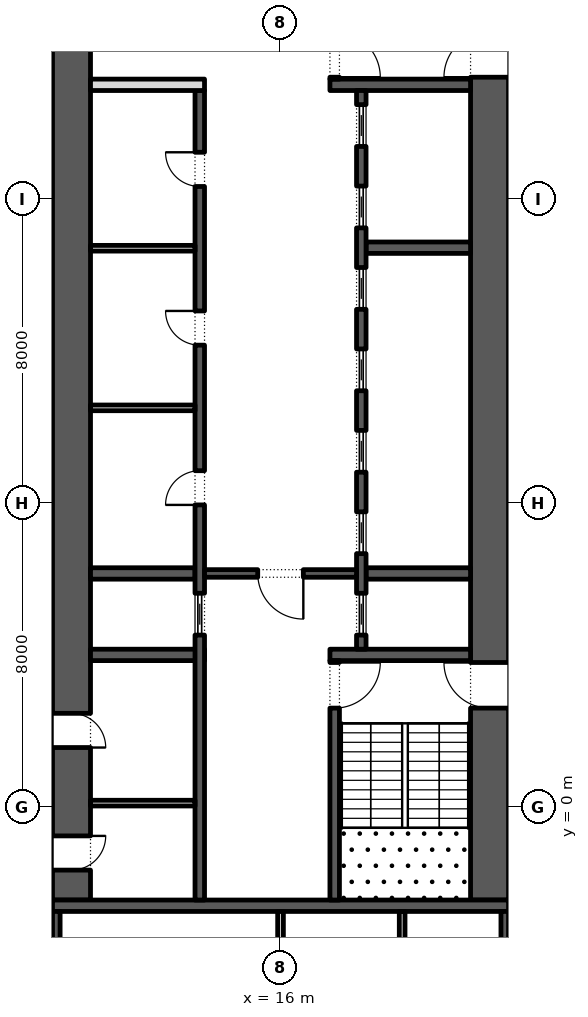
"""IFC4 building model, lengths in metres.
Left out: names, types, materials, properties, quantities, classifications, styles, units other than length and angle.
Written with IfcOpenShell. Run it as: python <this file> out.ifc"""

import sys

from ifc_helpers import new_model, si_unit, direction, frame, frame_2d, origin, place, context, subcontext, project, spatial, rectangle, extrude, element, fill, save


model = new_model("IFC4")
c1 = context("Model", 3, precision=1e-05, world=origin(), true_north=direction((0.0, 1.0)))
c2 = subcontext(c1, "Body", "Model", "MODEL_VIEW")
j1 = project(units=[si_unit("LENGTHUNIT", "METRE"), si_unit("PLANEANGLEUNIT", "RADIAN")], contexts=[c1])
p1 = place(None, origin())
s1 = spatial("IfcSite", under=j1, at=p1, CompositionType="ELEMENT")
p2 = place(p1, origin())
s2 = spatial("IfcBuilding", under=s1, at=p2, CompositionType="ELEMENT")
p3 = place(p2, frame((0.0, 0.0, 77.4)))
s3 = spatial("IfcBuildingStorey", under=s2, at=p3, CompositionType="ELEMENT", Elevation=77.4)
p4 = place(p3, frame((21.5, -2.45, 0.0), z_axis=(0.0, 0.0, 1.0), x_axis=(0.0, 1.0, 0.0)))
e1 = element("IfcWall", 1, at=p4, inside=s3, PredefinedType="SHEAR", context=c2, shape_type="SweptSolid", body=[
    extrude(rectangle(XDim=27.9, YDim=1.0, at=frame_2d((13.95, 0.0))), origin(), (0.0, 0.0, 1.0), 4.0),
])
p5 = place(p4, frame((5.05, 0.0, 0.0)))
e2 = element("IfcOpeningElement", 2, at=p5, cuts=e1, PredefinedType="OPENING", context=c2, shape_type="SweptSolid", body=[
    extrude(rectangle(XDim=1.2, YDim=2.1, at=frame_2d((0.6, 1.05))), frame((0.0, 0.51, 0.0), z_axis=(0.0, -1.0, 0.0), x_axis=(1.0, 0.0, 0.0)), (0.0, 0.0, 1.0), 1.02),
])
p6 = place(p4, frame((21.65, 0.0, 0.0)))
e3 = element("IfcOpeningElement", 3, at=p6, cuts=e1, PredefinedType="OPENING", context=c2, shape_type="SweptSolid", body=[
    extrude(rectangle(XDim=1.2, YDim=2.1, at=frame_2d((0.6, 1.05))), frame((0.0, 0.51, 0.0), z_axis=(0.0, -1.0, 0.0), x_axis=(1.0, 0.0, 0.0)), (0.0, 0.0, 1.0), 1.02),
])
p7 = place(p3, frame((10.5, -2.45, 0.0), z_axis=(0.0, 0.0, 1.0), x_axis=(0.0, 1.0, 0.0)))
e4 = element("IfcWall", 4, at=p7, inside=s3, PredefinedType="SHEAR", context=c2, shape_type="SweptSolid", body=[
    extrude(rectangle(XDim=27.9, YDim=1.0, at=frame_2d((13.95, 0.0))), origin(), (0.0, 0.0, 1.0), 4.0),
])
p8 = place(p7, frame((23.65, 0.0, 0.0)))
e5 = element("IfcOpeningElement", 5, at=p8, cuts=e4, PredefinedType="OPENING", context=c2, shape_type="SweptSolid", body=[
    extrude(rectangle(XDim=2.4, YDim=2.1, at=frame_2d((1.2, 1.05))), frame((0.0, 0.51, 0.0), z_axis=(0.0, -1.0, 0.0), x_axis=(1.0, 0.0, 0.0)), (0.0, 0.0, 1.0), 1.02),
])
p9 = place(p7, frame((0.788, 0.0, 0.0)))
e6 = element("IfcOpeningElement", 6, at=p9, cuts=e4, PredefinedType="OPENING", context=c2, shape_type="SweptSolid", body=[
    extrude(rectangle(XDim=0.9, YDim=2.1, at=frame_2d((0.45, 1.05))), frame((0.0, 0.51, 0.0), z_axis=(0.0, -1.0, 0.0), x_axis=(1.0, 0.0, 0.0)), (0.0, 0.0, 1.0), 1.02),
])
p10 = place(p7, frame((4.012, 0.0, 0.0)))
e7 = element("IfcOpeningElement", 7, at=p10, cuts=e4, PredefinedType="OPENING", context=c2, shape_type="SweptSolid", body=[
    extrude(rectangle(XDim=0.9, YDim=2.1, at=frame_2d((0.45, 1.05))), frame((0.0, 0.51, 0.0), z_axis=(0.0, -1.0, 0.0), x_axis=(1.0, 0.0, 0.0)), (0.0, 0.0, 1.0), 1.02),
])
p11 = place(p3, frame((10.0, -2.6, 0.0), z_axis=(0.0, 0.0, 1.0), x_axis=(1.0, 0.0, 0.0)))
e8 = element("IfcWall", 8, at=p11, inside=s3, PredefinedType="SHEAR", context=c2, shape_type="SweptSolid", body=[
    extrude(rectangle(XDim=12.0, YDim=0.3, at=frame_2d((6.0, 0.0))), origin(), (0.0, 0.0, 1.0), 4.0),
])
p12 = place(p3, frame((17.3, 4.0, 0.0), z_axis=(0.0, 0.0, 1.0), x_axis=(1.0, 0.0, 0.0)))
e9 = element("IfcWall", 9, at=p12, inside=s3, PredefinedType="SHEAR", context=c2, shape_type="SweptSolid", body=[
    extrude(rectangle(XDim=3.7, YDim=0.3, at=frame_2d((1.85, 0.0))), origin(), (0.0, 0.0, 1.0), 4.0),
])
p13 = place(p3, frame((17.425, -2.45, 0.0), z_axis=(0.0, 0.0, 1.0), x_axis=(0.0, 1.0, 0.0)))
e10 = element("IfcWall", 10, at=p13, inside=s3, PredefinedType="SHEAR", context=c2, shape_type="SweptSolid", body=[
    extrude(rectangle(XDim=6.3, YDim=0.25, at=frame_2d((3.15, 0.0))), origin(), (0.0, 0.0, 1.0), 4.0),
])
p14 = place(p13, frame((5.05, 0.0, 0.0)))
e11 = element("IfcOpeningElement", 11, at=p14, cuts=e10, PredefinedType="OPENING", context=c2, shape_type="SweptSolid", body=[
    extrude(rectangle(XDim=1.2, YDim=2.1, at=frame_2d((0.6, 1.05))), frame((0.0, 0.135, 0.0), z_axis=(0.0, -1.0, 0.0), x_axis=(1.0, 0.0, 0.0)), (0.0, 0.0, 1.0), 0.27),
])
p15 = place(p3, frame((17.3, 19.0, 0.0), z_axis=(0.0, 0.0, 1.0), x_axis=(1.0, 0.0, 0.0)))
e12 = element("IfcWall", 12, at=p15, inside=s3, PredefinedType="SHEAR", context=c2, shape_type="SweptSolid", body=[
    extrude(rectangle(XDim=3.7, YDim=0.3, at=frame_2d((1.85, 0.0))), origin(), (0.0, 0.0, 1.0), 4.0),
])
p16 = place(p3, frame((17.425, 19.15, 0.0), z_axis=(0.0, 0.0, 1.0), x_axis=(0.0, 1.0, 0.0)))
e13 = element("IfcWall", 13, at=p16, inside=s3, PredefinedType="SHEAR", context=c2, shape_type="SweptSolid", body=[
    extrude(rectangle(XDim=6.3, YDim=0.25, at=frame_2d((3.15, 0.0))), origin(), (0.0, 0.0, 1.0), 4.0),
])
p17 = place(p16, frame((0.05, 0.0, 0.0)))
e14 = element("IfcOpeningElement", 14, at=p17, cuts=e13, PredefinedType="OPENING", context=c2, shape_type="SweptSolid", body=[
    extrude(rectangle(XDim=1.2, YDim=2.1, at=frame_2d((0.6, 1.05))), frame((0.0, 0.135, 0.0), z_axis=(0.0, -1.0, 0.0), x_axis=(1.0, 0.0, 0.0)), (0.0, 0.0, 1.0), 0.27),
])
for number, where, z_axis, x_axis in (
    (15, (18.25, 6.143, 0.0), (0.0, 0.0, 1.0), (1.0, 0.0, 0.0)),
    (16, (18.25, 14.714, 0.0), (0.0, 0.0, 1.0), (1.0, 0.0, 0.0)),
):
    element("IfcWall", number, at=place(p3, frame(where, z_axis=z_axis, x_axis=x_axis)), inside=s3, PredefinedType="SHEAR", context=c2, shape_type="SweptSolid", body=[
        extrude(rectangle(XDim=2.75, YDim=0.3, at=frame_2d((1.375, 0.0))), origin(), (0.0, 0.0, 1.0), 4.0),
    ])
p18 = place(p3, frame((18.125, 4.15, 0.0), z_axis=(0.0, 0.0, 1.0), x_axis=(0.0, 1.0, 0.0)))
e17 = element("IfcWall", 17, at=p18, inside=s3, PredefinedType="SHEAR", context=c2, shape_type="SweptSolid", body=[
    extrude(rectangle(XDim=14.7, YDim=0.25, at=frame_2d((7.35, 0.0))), origin(), (0.0, 0.0, 1.0), 4.0),
])
p19 = place(p18, frame((0.371, 0.0, 0.0)))
e18 = element("IfcOpeningElement", 18, at=p19, cuts=e17, PredefinedType="OPENING", context=c2, shape_type="SweptSolid", body=[
    extrude(rectangle(XDim=1.1, YDim=2.1, at=frame_2d((0.55, 1.05))), frame((0.0, 0.135, 0.0), z_axis=(0.0, -1.0, 0.0), x_axis=(1.0, 0.0, 0.0)), (0.0, 0.0, 1.0), 0.27),
])
p20 = place(p18, frame((2.514, 0.0, 0.0)))
e19 = element("IfcOpeningElement", 19, at=p20, cuts=e17, PredefinedType="OPENING", context=c2, shape_type="SweptSolid", body=[
    extrude(rectangle(XDim=1.1, YDim=2.1, at=frame_2d((0.55, 1.05))), frame((0.0, 0.135, 0.0), z_axis=(0.0, -1.0, 0.0), x_axis=(1.0, 0.0, 0.0)), (0.0, 0.0, 1.0), 0.27),
])
p21 = place(p18, frame((4.657, 0.0, 0.0)))
e20 = element("IfcOpeningElement", 20, at=p21, cuts=e17, PredefinedType="OPENING", context=c2, shape_type="SweptSolid", body=[
    extrude(rectangle(XDim=1.1, YDim=2.1, at=frame_2d((0.55, 1.05))), frame((0.0, 0.135, 0.0), z_axis=(0.0, -1.0, 0.0), x_axis=(1.0, 0.0, 0.0)), (0.0, 0.0, 1.0), 0.27),
])
p22 = place(p18, frame((6.8, 0.0, 0.0)))
e21 = element("IfcOpeningElement", 21, at=p22, cuts=e17, PredefinedType="OPENING", context=c2, shape_type="SweptSolid", body=[
    extrude(rectangle(XDim=1.1, YDim=2.1, at=frame_2d((0.55, 1.05))), frame((0.0, 0.135, 0.0), z_axis=(0.0, -1.0, 0.0), x_axis=(1.0, 0.0, 0.0)), (0.0, 0.0, 1.0), 0.27),
])
p23 = place(p18, frame((8.943, 0.0, 0.0)))
e22 = element("IfcOpeningElement", 22, at=p23, cuts=e17, PredefinedType="OPENING", context=c2, shape_type="SweptSolid", body=[
    extrude(rectangle(XDim=1.1, YDim=2.1, at=frame_2d((0.55, 1.05))), frame((0.0, 0.135, 0.0), z_axis=(0.0, -1.0, 0.0), x_axis=(1.0, 0.0, 0.0)), (0.0, 0.0, 1.0), 0.27),
])
p24 = place(p18, frame((11.086, 0.0, 0.0)))
e23 = element("IfcOpeningElement", 23, at=p24, cuts=e17, PredefinedType="OPENING", context=c2, shape_type="SweptSolid", body=[
    extrude(rectangle(XDim=1.1, YDim=2.1, at=frame_2d((0.55, 1.05))), frame((0.0, 0.135, 0.0), z_axis=(0.0, -1.0, 0.0), x_axis=(1.0, 0.0, 0.0)), (0.0, 0.0, 1.0), 0.27),
])
p25 = place(p18, frame((13.229, 0.0, 0.0)))
e24 = element("IfcOpeningElement", 24, at=p25, cuts=e17, PredefinedType="OPENING", context=c2, shape_type="SweptSolid", body=[
    extrude(rectangle(XDim=1.1, YDim=2.1, at=frame_2d((0.55, 1.05))), frame((0.0, 0.135, 0.0), z_axis=(0.0, -1.0, 0.0), x_axis=(1.0, 0.0, 0.0)), (0.0, 0.0, 1.0), 0.27),
])
p26 = place(p3, frame((11.0, 4.0, 0.0), z_axis=(0.0, 0.0, 1.0), x_axis=(1.0, 0.0, 0.0)))
e25 = element("IfcWall", 25, at=p26, inside=s3, PredefinedType="SHEAR", context=c2, shape_type="SweptSolid", body=[
    extrude(rectangle(XDim=3.0, YDim=0.3, at=frame_2d((1.5, 0.0))), origin(), (0.0, 0.0, 1.0), 4.0),
])
p27 = place(p3, frame((11.0, 6.143, 0.0), z_axis=(0.0, 0.0, 1.0), x_axis=(1.0, 0.0, 0.0)))
e26 = element("IfcWall", 26, at=p27, inside=s3, PredefinedType="SHEAR", context=c2, shape_type="SweptSolid", body=[
    extrude(rectangle(XDim=2.75, YDim=0.3, at=frame_2d((1.375, 0.0))), origin(), (0.0, 0.0, 1.0), 4.0),
])
p28 = place(p3, frame((13.875, -2.45, 0.0), z_axis=(0.0, 0.0, 1.0), x_axis=(0.0, 1.0, 0.0)))
e27 = element("IfcWall", 27, at=p28, inside=s3, PredefinedType="SHEAR", context=c2, shape_type="SweptSolid", body=[
    extrude(rectangle(XDim=21.3, YDim=0.25, at=frame_2d((10.65, 0.0))), origin(), (0.0, 0.0, 1.0), 4.0),
])
p29 = place(p28, frame((10.396, 0.0, 0.0)))
e28 = element("IfcOpeningElement", 28, at=p29, cuts=e27, PredefinedType="OPENING", context=c2, shape_type="SweptSolid", body=[
    extrude(rectangle(XDim=0.9, YDim=2.1, at=frame_2d((0.45, 1.05))), frame((0.0, 0.135, 0.0), z_axis=(0.0, -1.0, 0.0), x_axis=(1.0, 0.0, 0.0)), (0.0, 0.0, 1.0), 0.27),
])
p30 = place(p28, frame((14.6, 0.0, 0.0)))
e29 = element("IfcOpeningElement", 29, at=p30, cuts=e27, PredefinedType="OPENING", context=c2, shape_type="SweptSolid", body=[
    extrude(rectangle(XDim=0.9, YDim=2.1, at=frame_2d((0.45, 1.05))), frame((0.0, 0.135, 0.0), z_axis=(0.0, -1.0, 0.0), x_axis=(1.0, 0.0, 0.0)), (0.0, 0.0, 1.0), 0.27),
])
p31 = place(p28, frame((18.775, 0.0, 0.0)))
e30 = element("IfcOpeningElement", 30, at=p31, cuts=e27, PredefinedType="OPENING", context=c2, shape_type="SweptSolid", body=[
    extrude(rectangle(XDim=0.9, YDim=2.1, at=frame_2d((0.45, 1.05))), frame((0.0, 0.135, 0.0), z_axis=(0.0, -1.0, 0.0), x_axis=(1.0, 0.0, 0.0)), (0.0, 0.0, 1.0), 0.27),
])
p32 = place(p28, frame((6.971, 0.0, 0.0)))
e31 = element("IfcOpeningElement", 31, at=p32, cuts=e27, PredefinedType="OPENING", context=c2, shape_type="SweptSolid", body=[
    extrude(rectangle(XDim=1.1, YDim=2.1, at=frame_2d((0.55, 1.05))), frame((0.0, 0.135, 0.0), z_axis=(0.0, -1.0, 0.0), x_axis=(1.0, 0.0, 0.0)), (0.0, 0.0, 1.0), 0.27),
])
p33 = place(p3, frame((11.0, 19.0, 0.0), z_axis=(0.0, 0.0, 1.0), x_axis=(1.0, 0.0, 0.0)))
e32 = element("IfcWall", 32, at=p33, inside=s3, PredefinedType="PARTITIONING", context=c2, shape_type="SweptSolid", body=[
    extrude(rectangle(XDim=3.0, YDim=0.3, at=frame_2d((1.5, 0.0))), origin(), (0.0, 0.0, 1.0), 4.0),
])
for number, where, z_axis, x_axis in (
    (33, (11.0, 10.5, 0.0), (0.0, 0.0, 1.0), (1.0, 0.0, 0.0)),
    (34, (11.0, 14.7, 0.0), (0.0, 0.0, 1.0), (1.0, 0.0, 0.0)),
):
    element("IfcWall", number, at=place(p3, frame(where, z_axis=z_axis, x_axis=x_axis)), inside=s3, PredefinedType="PARTITIONING", context=c2, shape_type="SweptSolid", body=[
        extrude(rectangle(XDim=2.75, YDim=0.15, at=frame_2d((1.375, 0.0))), origin(), (0.0, 0.0, 1.0), 4.0),
    ])
p34 = place(p3, frame((14.0, 6.143, 0.0), z_axis=(0.0, 0.0, 1.0), x_axis=(1.0, 0.0, 0.0)))
e35 = element("IfcWall", 35, at=p34, inside=s3, PredefinedType="SHEAR", context=c2, shape_type="SweptSolid", body=[
    extrude(rectangle(XDim=4.0, YDim=0.2, at=frame_2d((2.0, 0.0))), origin(), (0.0, 0.0, 1.0), 4.0),
])
p35 = place(p34, frame((1.4, 0.0, 0.0)))
e36 = element("IfcOpeningElement", 36, at=p35, cuts=e35, PredefinedType="OPENING", context=c2, shape_type="SweptSolid", body=[
    extrude(rectangle(XDim=1.2, YDim=2.1, at=frame_2d((0.6, 1.05))), frame((0.0, 0.11, 0.0), z_axis=(0.0, -1.0, 0.0), x_axis=(1.0, 0.0, 0.0)), (0.0, 0.0, 1.0), 0.22),
])
p36 = place(p3, frame((11.0, 0.1, 0.0), z_axis=(0.0, 0.0, 1.0), x_axis=(1.0, 0.0, 0.0)))
e37 = element("IfcWall", 37, at=p36, inside=s3, PredefinedType="PARTITIONING", context=c2, shape_type="SweptSolid", body=[
    extrude(rectangle(XDim=2.75, YDim=0.15, at=frame_2d((1.375, 0.0))), origin(), (0.0, 0.0, 1.0), 4.0),
])
p37 = place(p3, frame((21.9, -15.8, 0.0), z_axis=(0.0, 0.0, 1.0), x_axis=(0.0, 1.0, 0.0)))
e38 = element("IfcWall", 38, at=p37, inside=s3, PredefinedType="SHEAR", context=c2, shape_type="SweptSolid", body=[
    extrude(rectangle(XDim=13.05, YDim=0.2, at=frame_2d((6.525, 0.0))), origin(), (0.0, 0.0, 1.0), 4.0),
])
p38 = place(p37, frame((4.488, 0.0, 0.0)))
e39 = element("IfcOpeningElement", 39, at=p38, cuts=e38, PredefinedType="OPENING", context=c2, shape_type="SweptSolid", body=[
    extrude(rectangle(XDim=0.9, YDim=2.1, at=frame_2d((0.45, 1.05))), frame((0.0, 0.11, 0.0), z_axis=(0.0, -1.0, 0.0), x_axis=(1.0, 0.0, 0.0)), (0.0, 0.0, 1.0), 0.22),
])
p39 = place(p37, frame((11.038, 0.0, 0.0)))
e40 = element("IfcOpeningElement", 40, at=p39, cuts=e38, PredefinedType="OPENING", context=c2, shape_type="SweptSolid", body=[
    extrude(rectangle(XDim=1.0, YDim=2.1, at=frame_2d((0.5, 1.05))), frame((0.0, 0.11, 0.0), z_axis=(0.0, -1.0, 0.0), x_axis=(1.0, 0.0, 0.0)), (0.0, 0.0, 1.0), 0.22),
])
p40 = place(p3, frame((10.1, -15.8, 0.0), z_axis=(0.0, 0.0, 1.0), x_axis=(0.0, 1.0, 0.0)))
e41 = element("IfcWall", 41, at=p40, inside=s3, PredefinedType="SHEAR", context=c2, shape_type="SweptSolid", body=[
    extrude(rectangle(XDim=13.05, YDim=0.2, at=frame_2d((6.525, 0.0))), origin(), (0.0, 0.0, 1.0), 4.0),
])
p41 = place(p40, frame((6.075, 0.0, 0.0)))
e42 = element("IfcOpeningElement", 42, at=p41, cuts=e41, PredefinedType="OPENING", context=c2, shape_type="SweptSolid", body=[
    extrude(rectangle(XDim=0.9, YDim=2.1, at=frame_2d((0.45, 1.05))), frame((0.0, 0.11, 0.0), z_axis=(0.0, -1.0, 0.0), x_axis=(1.0, 0.0, 0.0)), (0.0, 0.0, 1.0), 0.22),
])
p42 = place(p3, frame((16.0, -15.8, 0.0), z_axis=(0.0, 0.0, 1.0), x_axis=(0.0, 1.0, 0.0)))
e43 = element("IfcWall", 43, at=p42, inside=s3, PredefinedType="PARTITIONING", context=c2, shape_type="SweptSolid", body=[
    extrude(rectangle(XDim=13.05, YDim=0.15, at=frame_2d((6.525, 0.0))), origin(), (0.0, 0.0, 1.0), 4.0),
])
p43 = place(p42, frame((11.087, 0.0, 0.0)))
e44 = element("IfcOpeningElement", 44, at=p43, cuts=e43, PredefinedType="OPENING", context=c2, shape_type="SweptSolid", body=[
    extrude(rectangle(XDim=0.9, YDim=2.1, at=frame_2d((0.45, 1.05))), frame((0.0, 0.085, 0.0), z_axis=(0.0, -1.0, 0.0), x_axis=(1.0, 0.0, 0.0)), (0.0, 0.0, 1.0), 0.17),
])
p44 = place(p3, frame((19.2, -5.775, 0.0), z_axis=(0.0, 0.0, 1.0), x_axis=(0.0, 1.0, 0.0)))
e45 = element("IfcWall", 45, at=p44, inside=s3, PredefinedType="PARTITIONING", context=c2, shape_type="SweptSolid", body=[
    extrude(rectangle(XDim=3.025, YDim=0.15, at=frame_2d((1.512, 0.0))), origin(), (0.0, 0.0, 1.0), 4.0),
])
p45 = place(p19, origin())
e46 = element("IfcDoor", 46, at=p45, inside=s3, OperationType="SLIDING_TO_LEFT", PredefinedType="DOOR", context=c2, shape_type="SweptSolid", body=[
    extrude(rectangle(XDim=1.1, YDim=2.1, at=frame_2d((0.55, 1.05))), frame((0.0, 0.025, 0.0), z_axis=(0.0, -1.0, 0.0), x_axis=(1.0, 0.0, 0.0)), (0.0, 0.0, 1.0), 0.05),
])
fill(e18, e46)
p46 = place(p20, origin())
e47 = element("IfcDoor", 47, at=p46, inside=s3, OperationType="SLIDING_TO_LEFT", PredefinedType="DOOR", context=c2, shape_type="SweptSolid", body=[
    extrude(rectangle(XDim=1.1, YDim=2.1, at=frame_2d((0.55, 1.05))), frame((0.0, 0.025, 0.0), z_axis=(0.0, -1.0, 0.0), x_axis=(1.0, 0.0, 0.0)), (0.0, 0.0, 1.0), 0.05),
])
fill(e19, e47)
p47 = place(p21, origin())
e48 = element("IfcDoor", 48, at=p47, inside=s3, OperationType="SLIDING_TO_LEFT", PredefinedType="DOOR", context=c2, shape_type="SweptSolid", body=[
    extrude(rectangle(XDim=1.1, YDim=2.1, at=frame_2d((0.55, 1.05))), frame((0.0, 0.025, 0.0), z_axis=(0.0, -1.0, 0.0), x_axis=(1.0, 0.0, 0.0)), (0.0, 0.0, 1.0), 0.05),
])
fill(e20, e48)
p48 = place(p22, origin())
e49 = element("IfcDoor", 49, at=p48, inside=s3, OperationType="SLIDING_TO_LEFT", PredefinedType="DOOR", context=c2, shape_type="SweptSolid", body=[
    extrude(rectangle(XDim=1.1, YDim=2.1, at=frame_2d((0.55, 1.05))), frame((0.0, 0.025, 0.0), z_axis=(0.0, -1.0, 0.0), x_axis=(1.0, 0.0, 0.0)), (0.0, 0.0, 1.0), 0.05),
])
fill(e21, e49)
p49 = place(p23, origin())
e50 = element("IfcDoor", 50, at=p49, inside=s3, OperationType="SLIDING_TO_LEFT", PredefinedType="DOOR", context=c2, shape_type="SweptSolid", body=[
    extrude(rectangle(XDim=1.1, YDim=2.1, at=frame_2d((0.55, 1.05))), frame((0.0, 0.025, 0.0), z_axis=(0.0, -1.0, 0.0), x_axis=(1.0, 0.0, 0.0)), (0.0, 0.0, 1.0), 0.05),
])
fill(e22, e50)
p50 = place(p24, origin())
e51 = element("IfcDoor", 51, at=p50, inside=s3, OperationType="SLIDING_TO_LEFT", PredefinedType="DOOR", context=c2, shape_type="SweptSolid", body=[
    extrude(rectangle(XDim=1.1, YDim=2.1, at=frame_2d((0.55, 1.05))), frame((0.0, 0.025, 0.0), z_axis=(0.0, -1.0, 0.0), x_axis=(1.0, 0.0, 0.0)), (0.0, 0.0, 1.0), 0.05),
])
fill(e23, e51)
p51 = place(p25, origin())
e52 = element("IfcDoor", 52, at=p51, inside=s3, OperationType="SLIDING_TO_LEFT", PredefinedType="DOOR", context=c2, shape_type="SweptSolid", body=[
    extrude(rectangle(XDim=1.1, YDim=2.1, at=frame_2d((0.55, 1.05))), frame((0.0, 0.025, 0.0), z_axis=(0.0, -1.0, 0.0), x_axis=(1.0, 0.0, 0.0)), (0.0, 0.0, 1.0), 0.05),
])
fill(e24, e52)
p52 = place(p29, origin())
e53 = element("IfcDoor", 53, at=p52, inside=s3, OperationType="SINGLE_SWING_RIGHT", PredefinedType="DOOR", context=c2, shape_type="SweptSolid", body=[
    extrude(rectangle(XDim=0.9, YDim=2.1, at=frame_2d((0.45, 1.05))), frame((0.0, 0.125, 0.0), z_axis=(0.0, -1.0, 0.0), x_axis=(1.0, 0.0, 0.0)), (0.0, 0.0, 1.0), 0.05),
])
fill(e28, e53)
p53 = place(p30, origin())
e54 = element("IfcDoor", 54, at=p53, inside=s3, OperationType="SINGLE_SWING_LEFT", PredefinedType="DOOR", context=c2, shape_type="SweptSolid", body=[
    extrude(rectangle(XDim=0.9, YDim=2.1, at=frame_2d((0.45, 1.05))), frame((0.0, 0.125, 0.0), z_axis=(0.0, -1.0, 0.0), x_axis=(1.0, 0.0, 0.0)), (0.0, 0.0, 1.0), 0.05),
])
fill(e29, e54)
p54 = place(p31, origin())
e55 = element("IfcDoor", 55, at=p54, inside=s3, OperationType="SINGLE_SWING_LEFT", PredefinedType="DOOR", context=c2, shape_type="SweptSolid", body=[
    extrude(rectangle(XDim=0.9, YDim=2.1, at=frame_2d((0.45, 1.05))), frame((0.0, 0.125, 0.0), z_axis=(0.0, -1.0, 0.0), x_axis=(1.0, 0.0, 0.0)), (0.0, 0.0, 1.0), 0.05),
])
fill(e30, e55)
p55 = place(p32, origin())
e56 = element("IfcDoor", 56, at=p55, inside=s3, OperationType="SLIDING_TO_LEFT", PredefinedType="DOOR", context=c2, shape_type="SweptSolid", body=[
    extrude(rectangle(XDim=1.1, YDim=2.1, at=frame_2d((0.55, 1.05))), frame((0.0, 0.025, 0.0), z_axis=(0.0, -1.0, 0.0), x_axis=(1.0, 0.0, 0.0)), (0.0, 0.0, 1.0), 0.05),
])
fill(e31, e56)
p56 = place(p35, frame((1.2, 0.0, 0.0), z_axis=(0.0, 0.0, 1.0), x_axis=(-1.0, 0.0, 0.0)))
e57 = element("IfcDoor", 57, at=p56, inside=s3, OperationType="SINGLE_SWING_RIGHT", PredefinedType="DOOR", context=c2, shape_type="SweptSolid", body=[
    extrude(rectangle(XDim=1.2, YDim=2.1, at=frame_2d((0.6, 1.05))), frame((0.0, 0.025, 0.0), z_axis=(0.0, -1.0, 0.0), x_axis=(1.0, 0.0, 0.0)), (0.0, 0.0, 1.0), 0.05),
])
fill(e36, e57)
p57 = place(p14, frame((1.2, 0.0, 0.0), z_axis=(0.0, 0.0, 1.0), x_axis=(-1.0, 0.0, 0.0)))
e58 = element("IfcDoor", 58, at=p57, inside=s3, OperationType="SINGLE_SWING_RIGHT", PredefinedType="DOOR", context=c2, shape_type="SweptSolid", body=[
    extrude(rectangle(XDim=1.2, YDim=2.1, at=frame_2d((0.6, 1.05))), frame((0.0, 0.025, 0.0), z_axis=(0.0, -1.0, 0.0), x_axis=(1.0, 0.0, 0.0)), (0.0, 0.0, 1.0), 0.05),
])
fill(e11, e58)
p58 = place(p5, origin())
e59 = element("IfcDoor", 59, at=p58, inside=s3, OperationType="SINGLE_SWING_LEFT", PredefinedType="DOOR", context=c2, shape_type="SweptSolid", body=[
    extrude(rectangle(XDim=1.2, YDim=2.1, at=frame_2d((0.6, 1.05))), frame((0.0, 0.025, 0.0), z_axis=(0.0, -1.0, 0.0), x_axis=(1.0, 0.0, 0.0)), (0.0, 0.0, 1.0), 0.05),
])
fill(e2, e59)
p59 = place(p17, frame((1.2, 0.0, 0.0), z_axis=(0.0, 0.0, 1.0), x_axis=(-1.0, 0.0, 0.0)))
e60 = element("IfcDoor", 60, at=p59, inside=s3, OperationType="SINGLE_SWING_LEFT", PredefinedType="DOOR", context=c2, shape_type="SweptSolid", body=[
    extrude(rectangle(XDim=1.2, YDim=2.1, at=frame_2d((0.6, 1.05))), frame((0.0, 0.025, 0.0), z_axis=(0.0, -1.0, 0.0), x_axis=(1.0, 0.0, 0.0)), (0.0, 0.0, 1.0), 0.05),
])
fill(e14, e60)
p60 = place(p6, origin())
e61 = element("IfcDoor", 61, at=p60, inside=s3, OperationType="SINGLE_SWING_RIGHT", PredefinedType="DOOR", context=c2, shape_type="SweptSolid", body=[
    extrude(rectangle(XDim=1.2, YDim=2.1, at=frame_2d((0.6, 1.05))), frame((0.0, 0.025, 0.0), z_axis=(0.0, -1.0, 0.0), x_axis=(1.0, 0.0, 0.0)), (0.0, 0.0, 1.0), 0.05),
])
fill(e3, e61)
p61 = place(p9, frame((0.9, -0.95, 0.0), z_axis=(0.0, 0.0, 1.0), x_axis=(-1.0, 0.0, 0.0)))
e62 = element("IfcDoor", 62, at=p61, inside=s3, OperationType="SINGLE_SWING_RIGHT", PredefinedType="DOOR", context=c2, shape_type="SweptSolid", body=[
    extrude(rectangle(XDim=0.9, YDim=2.1, at=frame_2d((0.45, 1.05))), frame((0.0, -0.45, 0.0), z_axis=(0.0, -1.0, 0.0), x_axis=(1.0, 0.0, 0.0)), (0.0, 0.0, 1.0), 0.05),
])
fill(e6, e62)
p62 = place(p10, frame((0.9, -0.95, 0.0), z_axis=(0.0, 0.0, 1.0), x_axis=(-1.0, 0.0, 0.0)))
e63 = element("IfcDoor", 63, at=p62, inside=s3, OperationType="SINGLE_SWING_LEFT", PredefinedType="DOOR", context=c2, shape_type="SweptSolid", body=[
    extrude(rectangle(XDim=0.9, YDim=2.1, at=frame_2d((0.45, 1.05))), frame((0.0, -0.45, 0.0), z_axis=(0.0, -1.0, 0.0), x_axis=(1.0, 0.0, 0.0)), (0.0, 0.0, 1.0), 0.05),
])
fill(e7, e63)
save(model, sys.argv[1])
